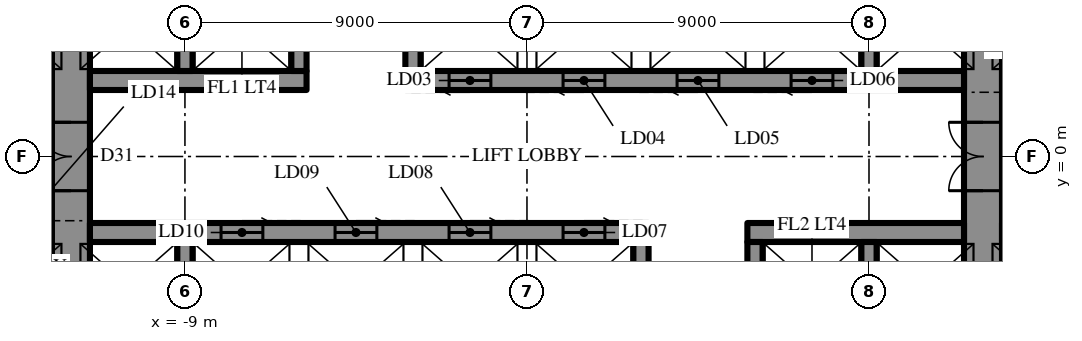
"""IFC4 building model, lengths in metres.
Left out: names, types, materials, properties, quantities, classifications, styles, units other than length and angle.
Written with IfcOpenShell. Run it as: python <this file> out.ifc"""

import sys

from ifc_helpers import new_model, si_unit, direction, frame, frame_2d, origin, place, context, subcontext, project, spatial, rectangle, extrude, element, fill, save


model = new_model("IFC4")
c1 = context("Model", 3, precision=1e-05, world=origin(), true_north=direction((0.0, 1.0)))
c2 = subcontext(c1, "Body", "Model", "MODEL_VIEW")
j1 = project(units=[si_unit("LENGTHUNIT", "METRE"), si_unit("PLANEANGLEUNIT", "RADIAN")], contexts=[c1])
p1 = place(None, origin())
s1 = spatial("IfcSite", under=j1, at=p1, CompositionType="ELEMENT")
p2 = place(p1, origin())
s2 = spatial("IfcBuilding", under=s1, at=p2, CompositionType="ELEMENT")
p3 = place(p2, frame((0.0, 0.0, 210.5)))
s3 = spatial("IfcBuildingStorey", under=s2, at=p3, CompositionType="ELEMENT", Elevation=210.5)
p4 = place(p3, frame((12.0, -10.7, 0.0), z_axis=(0.0, 0.0, 1.0), x_axis=(0.0, 1.0, 0.0)))
e1 = element("IfcWall", 1, at=p4, inside=s3, PredefinedType="SHEAR", context=c2, shape_type="SweptSolid", body=[
    extrude(rectangle(XDim=21.4, YDim=1.0, at=frame_2d((10.7, 0.0))), origin(), (0.0, 0.0, 1.0), 5.0),
])
p5 = place(p4, frame((9.8, 0.0, 0.0)))
e2 = element("IfcOpeningElement", 2, at=p5, cuts=e1, PredefinedType="OPENING", context=c2, shape_type="SweptSolid", body=[
    extrude(rectangle(XDim=1.8, YDim=2.4, at=frame_2d((0.9, 1.2))), frame((0.0, 0.51, 0.0), z_axis=(0.0, -1.0, 0.0), x_axis=(1.0, 0.0, 0.0)), (0.0, 0.0, 1.0), 1.02),
])
p6 = place(p3, frame((-12.0, -10.7, 0.0), z_axis=(0.0, 0.0, 1.0), x_axis=(0.0, 1.0, 0.0)))
e3 = element("IfcWall", 3, at=p6, inside=s3, PredefinedType="SHEAR", context=c2, shape_type="SweptSolid", body=[
    extrude(rectangle(XDim=21.4, YDim=1.0, at=frame_2d((10.7, 0.0))), origin(), (0.0, 0.0, 1.0), 5.0),
])
p7 = place(p6, frame((9.8, 0.0, 0.0)))
e4 = element("IfcOpeningElement", 4, at=p7, cuts=e3, PredefinedType="OPENING", context=c2, shape_type="SweptSolid", body=[
    extrude(rectangle(XDim=1.8, YDim=2.4, at=frame_2d((0.9, 1.2))), frame((0.0, 0.51, 0.0), z_axis=(0.0, -1.0, 0.0), x_axis=(1.0, 0.0, 0.0)), (0.0, 0.0, 1.0), 1.02),
])
p8 = place(p3, frame((-11.5, 2.0, 0.0), z_axis=(0.0, 0.0, 1.0), x_axis=(1.0, 0.0, 0.0)))
e5 = element("IfcWall", 5, at=p8, inside=s3, PredefinedType="SHEAR", context=c2, shape_type="SweptSolid", body=[
    extrude(rectangle(XDim=5.7, YDim=0.5, at=frame_2d((2.85, 0.0))), origin(), (0.0, 0.0, 1.0), 5.0),
])
p9 = place(p3, frame((-3.2, 2.0, 0.0), z_axis=(0.0, 0.0, 1.0), x_axis=(1.0, 0.0, 0.0)))
e6 = element("IfcWall", 6, at=p9, inside=s3, PredefinedType="SHEAR", context=c2, shape_type="SweptSolid", body=[
    extrude(rectangle(XDim=14.7, YDim=0.5, at=frame_2d((7.35, 0.0))), origin(), (0.0, 0.0, 1.0), 5.0),
])
p10 = place(p9, frame((1.15, 0.0, 0.0)))
e7 = element("IfcOpeningElement", 7, at=p10, cuts=e6, PredefinedType="OPENING", context=c2, shape_type="SweptSolid", body=[
    extrude(rectangle(XDim=1.1, YDim=2.2, at=frame_2d((0.55, 1.1))), frame((0.0, 0.26, 0.0), z_axis=(0.0, -1.0, 0.0), x_axis=(1.0, 0.0, 0.0)), (0.0, 0.0, 1.0), 0.52),
])
p11 = place(p9, frame((4.15, 0.0, 0.0)))
e8 = element("IfcOpeningElement", 8, at=p11, cuts=e6, PredefinedType="OPENING", context=c2, shape_type="SweptSolid", body=[
    extrude(rectangle(XDim=1.1, YDim=2.2, at=frame_2d((0.55, 1.1))), frame((0.0, 0.26, 0.0), z_axis=(0.0, -1.0, 0.0), x_axis=(1.0, 0.0, 0.0)), (0.0, 0.0, 1.0), 0.52),
])
p12 = place(p9, frame((7.15, 0.0, 0.0)))
e9 = element("IfcOpeningElement", 9, at=p12, cuts=e6, PredefinedType="OPENING", context=c2, shape_type="SweptSolid", body=[
    extrude(rectangle(XDim=1.1, YDim=2.2, at=frame_2d((0.55, 1.1))), frame((0.0, 0.26, 0.0), z_axis=(0.0, -1.0, 0.0), x_axis=(1.0, 0.0, 0.0)), (0.0, 0.0, 1.0), 0.52),
])
p13 = place(p9, frame((10.15, 0.0, 0.0)))
e10 = element("IfcOpeningElement", 10, at=p13, cuts=e6, PredefinedType="OPENING", context=c2, shape_type="SweptSolid", body=[
    extrude(rectangle(XDim=1.1, YDim=2.2, at=frame_2d((0.55, 1.1))), frame((0.0, 0.26, 0.0), z_axis=(0.0, -1.0, 0.0), x_axis=(1.0, 0.0, 0.0)), (0.0, 0.0, 1.0), 0.52),
])
for number, where, z_axis, x_axis in (
    (11, (-9.0, 2.25, 0.0), (0.0, 0.0, 1.0), (0.0, 1.0, 0.0)),
    (12, (-6.0, 2.25, 0.0), (0.0, 0.0, 1.0), (0.0, 1.0, 0.0)),
    (13, (-3.0, 2.25, 0.0), (0.0, 0.0, 1.0), (0.0, 1.0, 0.0)),
    (14, (9.0, 2.25, 0.0), (0.0, 0.0, 1.0), (0.0, 1.0, 0.0)),
):
    element("IfcWall", number, at=place(p3, frame(where, z_axis=z_axis, x_axis=x_axis)), inside=s3, PredefinedType="SHEAR", context=c2, shape_type="SweptSolid", body=[
        extrude(rectangle(XDim=2.3, YDim=0.4, at=frame_2d((1.15, 0.0))), origin(), (0.0, 0.0, 1.0), 5.0),
    ])
p14 = place(p3, frame((11.5, -2.0, 0.0), z_axis=(0.0, 0.0, 1.0), x_axis=(-1.0, 0.0, 0.0)))
e15 = element("IfcWall", 15, at=p14, inside=s3, PredefinedType="SHEAR", context=c2, shape_type="SweptSolid", body=[
    extrude(rectangle(XDim=5.7, YDim=0.5, at=frame_2d((2.85, 0.0))), origin(), (0.0, 0.0, 1.0), 5.0),
])
p15 = place(p3, frame((3.2, -2.0, 0.0), z_axis=(0.0, 0.0, 1.0), x_axis=(-1.0, 0.0, 0.0)))
e16 = element("IfcWall", 16, at=p15, inside=s3, PredefinedType="SHEAR", context=c2, shape_type="SweptSolid", body=[
    extrude(rectangle(XDim=14.7, YDim=0.5, at=frame_2d((7.35, 0.0))), origin(), (0.0, 0.0, 1.0), 5.0),
])
p16 = place(p15, frame((1.15, 0.0, 0.0)))
e17 = element("IfcOpeningElement", 17, at=p16, cuts=e16, PredefinedType="OPENING", context=c2, shape_type="SweptSolid", body=[
    extrude(rectangle(XDim=1.1, YDim=2.2, at=frame_2d((0.55, 1.1))), frame((0.0, 0.26, 0.0), z_axis=(0.0, -1.0, 0.0), x_axis=(1.0, 0.0, 0.0)), (0.0, 0.0, 1.0), 0.52),
])
p17 = place(p15, frame((4.15, 0.0, 0.0)))
e18 = element("IfcOpeningElement", 18, at=p17, cuts=e16, PredefinedType="OPENING", context=c2, shape_type="SweptSolid", body=[
    extrude(rectangle(XDim=1.1, YDim=2.2, at=frame_2d((0.55, 1.1))), frame((0.0, 0.26, 0.0), z_axis=(0.0, -1.0, 0.0), x_axis=(1.0, 0.0, 0.0)), (0.0, 0.0, 1.0), 0.52),
])
p18 = place(p15, frame((7.15, 0.0, 0.0)))
e19 = element("IfcOpeningElement", 19, at=p18, cuts=e16, PredefinedType="OPENING", context=c2, shape_type="SweptSolid", body=[
    extrude(rectangle(XDim=1.1, YDim=2.2, at=frame_2d((0.55, 1.1))), frame((0.0, 0.26, 0.0), z_axis=(0.0, -1.0, 0.0), x_axis=(1.0, 0.0, 0.0)), (0.0, 0.0, 1.0), 0.52),
])
p19 = place(p15, frame((10.15, 0.0, 0.0)))
e20 = element("IfcOpeningElement", 20, at=p19, cuts=e16, PredefinedType="OPENING", context=c2, shape_type="SweptSolid", body=[
    extrude(rectangle(XDim=1.1, YDim=2.2, at=frame_2d((0.55, 1.1))), frame((0.0, 0.26, 0.0), z_axis=(0.0, -1.0, 0.0), x_axis=(1.0, 0.0, 0.0)), (0.0, 0.0, 1.0), 0.52),
])
for number, where, z_axis, x_axis in (
    (21, (9.0, -2.25, 0.0), (0.0, 0.0, 1.0), (0.0, -1.0, 0.0)),
    (22, (6.0, -2.25, 0.0), (0.0, 0.0, 1.0), (0.0, -1.0, 0.0)),
    (23, (3.0, -2.25, 0.0), (0.0, 0.0, 1.0), (0.0, -1.0, 0.0)),
    (24, (-9.0, -2.25, 0.0), (0.0, 0.0, 1.0), (0.0, -1.0, 0.0)),
):
    element("IfcWall", number, at=place(p3, frame(where, z_axis=z_axis, x_axis=x_axis)), inside=s3, PredefinedType="SHEAR", context=c2, shape_type="SweptSolid", body=[
        extrude(rectangle(XDim=2.3, YDim=0.4, at=frame_2d((1.15, 0.0))), origin(), (0.0, 0.0, 1.0), 5.0),
    ])
p20 = place(p5, origin())
e25 = element("IfcDoor", 25, at=p20, inside=s3, OperationType="DOUBLE_DOOR_SINGLE_SWING", PredefinedType="DOOR", context=c2, shape_type="SweptSolid", body=[
    extrude(rectangle(XDim=1.8, YDim=2.4, at=frame_2d((0.9, 1.2))), frame((0.0, 0.025, 0.0), z_axis=(0.0, -1.0, 0.0), x_axis=(1.0, 0.0, 0.0)), (0.0, 0.0, 1.0), 0.05),
])
fill(e2, e25)
p21 = place(p7, origin())
e26 = element("IfcDoor", 26, at=p21, inside=s3, OperationType="DOUBLE_DOOR_SINGLE_SWING", PredefinedType="DOOR", context=c2, shape_type="SweptSolid", body=[
    extrude(rectangle(XDim=1.8, YDim=2.4, at=frame_2d((0.9, 1.2))), frame((0.0, 0.025, 0.0), z_axis=(0.0, -1.0, 0.0), x_axis=(1.0, 0.0, 0.0)), (0.0, 0.0, 1.0), 0.05),
])
fill(e4, e26)
p22 = place(p10, frame((1.1, 0.0, 0.0), z_axis=(0.0, 0.0, 1.0), x_axis=(-1.0, 0.0, 0.0)))
e27 = element("IfcDoor", 27, at=p22, inside=s3, OperationType="SLIDING_TO_LEFT", PredefinedType="DOOR", context=c2, shape_type="SweptSolid", body=[
    extrude(rectangle(XDim=1.1, YDim=2.2, at=frame_2d((0.55, 1.1))), frame((0.0, 0.025, 0.0), z_axis=(0.0, -1.0, 0.0), x_axis=(1.0, 0.0, 0.0)), (0.0, 0.0, 1.0), 0.05),
])
fill(e7, e27)
p23 = place(p11, frame((1.1, 0.0, 0.0), z_axis=(0.0, 0.0, 1.0), x_axis=(-1.0, 0.0, 0.0)))
e28 = element("IfcDoor", 28, at=p23, inside=s3, OperationType="SLIDING_TO_LEFT", PredefinedType="DOOR", context=c2, shape_type="SweptSolid", body=[
    extrude(rectangle(XDim=1.1, YDim=2.2, at=frame_2d((0.55, 1.1))), frame((0.0, 0.025, 0.0), z_axis=(0.0, -1.0, 0.0), x_axis=(1.0, 0.0, 0.0)), (0.0, 0.0, 1.0), 0.05),
])
fill(e8, e28)
p24 = place(p12, frame((1.1, 0.0, 0.0), z_axis=(0.0, 0.0, 1.0), x_axis=(-1.0, 0.0, 0.0)))
e29 = element("IfcDoor", 29, at=p24, inside=s3, OperationType="SLIDING_TO_LEFT", PredefinedType="DOOR", context=c2, shape_type="SweptSolid", body=[
    extrude(rectangle(XDim=1.1, YDim=2.2, at=frame_2d((0.55, 1.1))), frame((0.0, 0.025, 0.0), z_axis=(0.0, -1.0, 0.0), x_axis=(1.0, 0.0, 0.0)), (0.0, 0.0, 1.0), 0.05),
])
fill(e9, e29)
p25 = place(p13, frame((1.1, 0.0, 0.0), z_axis=(0.0, 0.0, 1.0), x_axis=(-1.0, 0.0, 0.0)))
e30 = element("IfcDoor", 30, at=p25, inside=s3, OperationType="SLIDING_TO_LEFT", PredefinedType="DOOR", context=c2, shape_type="SweptSolid", body=[
    extrude(rectangle(XDim=1.1, YDim=2.2, at=frame_2d((0.55, 1.1))), frame((0.0, 0.025, 0.0), z_axis=(0.0, -1.0, 0.0), x_axis=(1.0, 0.0, 0.0)), (0.0, 0.0, 1.0), 0.05),
])
fill(e10, e30)
p26 = place(p16, frame((1.1, 0.0, 0.0), z_axis=(0.0, 0.0, 1.0), x_axis=(-1.0, 0.0, 0.0)))
e31 = element("IfcDoor", 31, at=p26, inside=s3, OperationType="SLIDING_TO_LEFT", PredefinedType="DOOR", context=c2, shape_type="SweptSolid", body=[
    extrude(rectangle(XDim=1.1, YDim=2.2, at=frame_2d((0.55, 1.1))), frame((0.0, 0.025, 0.0), z_axis=(0.0, -1.0, 0.0), x_axis=(1.0, 0.0, 0.0)), (0.0, 0.0, 1.0), 0.05),
])
fill(e17, e31)
p27 = place(p17, frame((1.1, 0.0, 0.0), z_axis=(0.0, 0.0, 1.0), x_axis=(-1.0, 0.0, 0.0)))
e32 = element("IfcDoor", 32, at=p27, inside=s3, OperationType="SLIDING_TO_LEFT", PredefinedType="DOOR", context=c2, shape_type="SweptSolid", body=[
    extrude(rectangle(XDim=1.1, YDim=2.2, at=frame_2d((0.55, 1.1))), frame((0.0, 0.025, 0.0), z_axis=(0.0, -1.0, 0.0), x_axis=(1.0, 0.0, 0.0)), (0.0, 0.0, 1.0), 0.05),
])
fill(e18, e32)
p28 = place(p18, frame((1.1, 0.0, 0.0), z_axis=(0.0, 0.0, 1.0), x_axis=(-1.0, 0.0, 0.0)))
e33 = element("IfcDoor", 33, at=p28, inside=s3, OperationType="SLIDING_TO_LEFT", PredefinedType="DOOR", context=c2, shape_type="SweptSolid", body=[
    extrude(rectangle(XDim=1.1, YDim=2.2, at=frame_2d((0.55, 1.1))), frame((0.0, 0.025, 0.0), z_axis=(0.0, -1.0, 0.0), x_axis=(1.0, 0.0, 0.0)), (0.0, 0.0, 1.0), 0.05),
])
fill(e19, e33)
p29 = place(p19, frame((1.1, 0.0, 0.0), z_axis=(0.0, 0.0, 1.0), x_axis=(-1.0, 0.0, 0.0)))
e34 = element("IfcDoor", 34, at=p29, inside=s3, OperationType="SLIDING_TO_LEFT", PredefinedType="DOOR", context=c2, shape_type="SweptSolid", body=[
    extrude(rectangle(XDim=1.1, YDim=2.2, at=frame_2d((0.55, 1.1))), frame((0.0, 0.025, 0.0), z_axis=(0.0, -1.0, 0.0), x_axis=(1.0, 0.0, 0.0)), (0.0, 0.0, 1.0), 0.05),
])
fill(e20, e34)
save(model, sys.argv[1])
